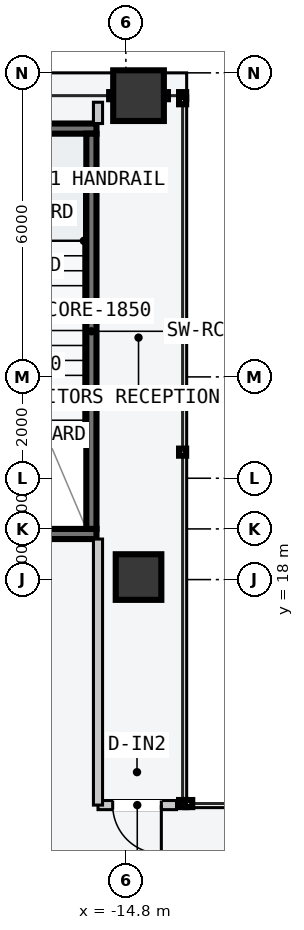
"""IFC4 building model, lengths in metres.
Left out: names, types, materials, properties, quantities, classifications, styles, units other than length and angle.
Written with IfcOpenShell. Run it as: python <this file> out.ifc"""

import sys

from ifc_helpers import new_model, si_unit, direction, frame, frame_2d, origin, origin_2d, place, context, subcontext, project, spatial, rectangle, hollow_rectangle, extrude, element, fill, save


model = new_model("IFC4")
c1 = context("Model", 3, precision=1e-05, world=origin(), true_north=direction((0.0, 1.0)))
c2 = subcontext(c1, "Body", "Model", "MODEL_VIEW")
j1 = project(units=[si_unit("LENGTHUNIT", "METRE"), si_unit("PLANEANGLEUNIT", "RADIAN")], contexts=[c1])
p1 = place(None, origin())
s1 = spatial("IfcSite", under=j1, at=p1, CompositionType="ELEMENT")
p2 = place(p1, origin())
s2 = spatial("IfcBuilding", under=s1, at=p2, CompositionType="ELEMENT")
p3 = place(p2, frame((0.0, 0.0, 9.6)))
s3 = spatial("IfcBuildingStorey", under=s2, at=p3, CompositionType="ELEMENT", Elevation=9.6)
p4 = place(p3, frame((-19.1, 18.9, -0.22), z_axis=(0.0, 0.0, 1.0), x_axis=(1.0, 0.0, 0.0)))
e1 = element("IfcWall", 1, at=p4, inside=s3, PredefinedType="SOLIDWALL", context=c2, shape_type="SweptSolid", body=[
    extrude(rectangle(XDim=3.72, YDim=0.2, at=frame_2d((1.86, 0.0))), origin(), (0.0, 0.0, 1.0), 4.8),
])
p5 = place(p4, frame((1.3, 0.0, 0.22)))
e2 = element("IfcOpeningElement", 2, at=p5, cuts=e1, PredefinedType="OPENING", context=c2, shape_type="SweptSolid", body=[
    extrude(rectangle(XDim=1.12, YDim=2.18, at=frame_2d((0.56, 1.09))), frame((0.0, 0.11, 0.0), z_axis=(0.0, -1.0, 0.0), x_axis=(1.0, 0.0, 0.0)), (0.0, 0.0, 1.0), 0.22),
])
p6 = place(p3, frame((-19.1, 26.9, -0.22), z_axis=(0.0, 0.0, 1.0), x_axis=(1.0, 0.0, 0.0)))
e3 = element("IfcWall", 3, at=p6, inside=s3, PredefinedType="SOLIDWALL", context=c2, shape_type="SweptSolid", body=[
    extrude(rectangle(XDim=3.72, YDim=0.2, at=frame_2d((1.86, 0.0))), origin(), (0.0, 0.0, 1.0), 4.8),
])
p7 = place(p3, frame((-15.48, 19.0, -0.22), z_axis=(0.0, 0.0, 1.0), x_axis=(0.0, 1.0, 0.0)))
e4 = element("IfcWall", 4, at=p7, inside=s3, PredefinedType="SOLIDWALL", context=c2, shape_type="SweptSolid", body=[
    extrude(rectangle(XDim=7.8, YDim=0.2, at=frame_2d((3.9, 0.0))), origin(), (0.0, 0.0, 1.0), 4.8),
])
p8 = place(p3, frame((-14.55, 18.05, 0.0), z_axis=(0.0, 0.0, 1.0), x_axis=(1.0, 0.0, 0.0)))
e5 = element("IfcColumn", 5, at=p8, inside=s3, PredefinedType="COLUMN", context=c2, shape_type="SweptSolid", body=[
    extrude(hollow_rectangle(XDim=0.9, YDim=0.9, WallThickness=0.045, at=origin_2d()), origin(), (0.0, 0.0, 1.0), 4.8),
])
p9 = place(p3, frame((-14.55, 27.55, 0.0), z_axis=(0.0, 0.0, 1.0), x_axis=(1.0, 0.0, 0.0)))
e6 = element("IfcColumn", 6, at=p9, inside=s3, PredefinedType="COLUMN", context=c2, shape_type="SweptSolid", body=[
    extrude(hollow_rectangle(XDim=1.0, YDim=1.0, WallThickness=0.05, at=origin_2d()), origin(), (0.0, 0.0, 1.0), 4.8),
])
p10 = place(p3, frame((-13.8, 13.55, 0.0), z_axis=(0.0, 0.0, 1.0), x_axis=(-1.0, 0.0, 0.0)))
e7 = element("IfcWall", 7, at=p10, inside=s3, PredefinedType="PARTITIONING", context=c2, shape_type="SweptSolid", body=[
    extrude(rectangle(XDim=1.55, YDim=0.18, at=frame_2d((0.775, 0.0))), origin(), (0.0, 0.0, 1.0), 4.58),
])
p11 = place(p10, frame((0.3, 0.0, 0.0)))
e8 = element("IfcOpeningElement", 8, at=p11, cuts=e7, PredefinedType="OPENING", context=c2, shape_type="SweptSolid", body=[
    extrude(rectangle(XDim=0.96, YDim=2.18, at=frame_2d((0.48, 1.09))), frame((0.0, 0.1, 0.0), z_axis=(0.0, -1.0, 0.0), x_axis=(1.0, 0.0, 0.0)), (0.0, 0.0, 1.0), 0.2),
])
p12 = place(p3, frame((-15.35, 13.55, 0.0), z_axis=(0.0, 0.0, 1.0), x_axis=(0.0, 1.0, 0.0)))
e9 = element("IfcWall", 9, at=p12, inside=s3, PredefinedType="PARTITIONING", context=c2, shape_type="SweptSolid", body=[
    extrude(rectangle(XDim=5.25, YDim=0.18, at=frame_2d((2.625, 0.0))), origin(), (0.0, 0.0, 1.0), 4.58),
])
p13 = place(p3, frame((-15.35, 27.0, 0.0), z_axis=(0.0, 0.0, 1.0), x_axis=(0.0, 1.0, 0.0)))
e10 = element("IfcWall", 10, at=p13, inside=s3, PredefinedType="PARTITIONING", context=c2, shape_type="SweptSolid", body=[
    extrude(rectangle(XDim=0.42, YDim=0.18, at=frame_2d((0.21, 0.0))), origin(), (0.0, 0.0, 1.0), 4.58),
])
p14 = place(p11, origin())
e11 = element("IfcDoor", 11, at=p14, inside=s3, OperationType="SINGLE_SWING_LEFT", PredefinedType="DOOR", context=c2, shape_type="SweptSolid", body=[
    extrude(rectangle(XDim=0.96, YDim=2.18, at=frame_2d((0.48, 1.09))), frame((0.0, 0.025, 0.0), z_axis=(0.0, -1.0, 0.0), x_axis=(1.0, 0.0, 0.0)), (0.0, 0.0, 1.0), 0.05),
])
fill(e8, e11)
save(model, sys.argv[1])
